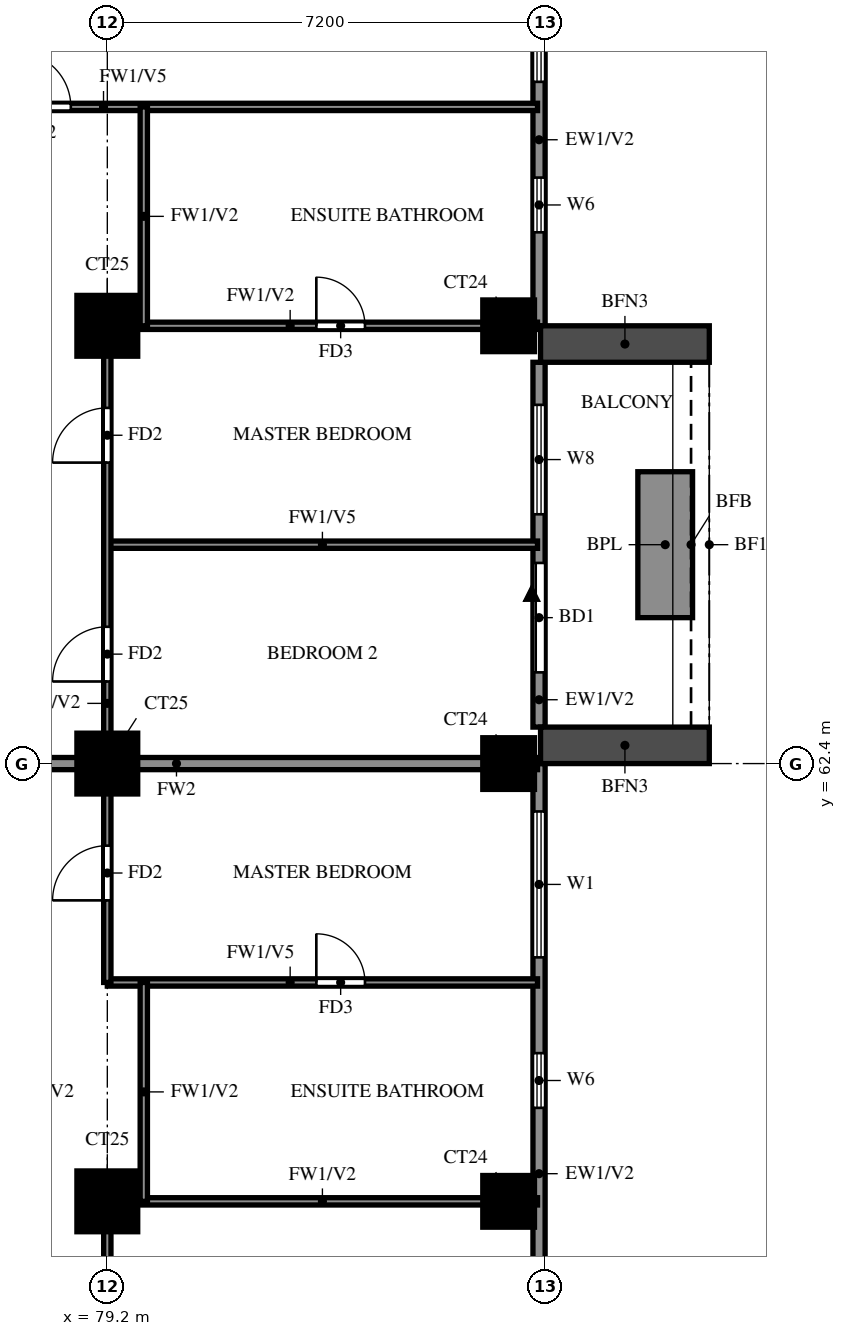
"""IFC4 building model, lengths in metres.
Left out: names, types, materials, properties, quantities, classifications, styles, units other than length and angle.
Written with IfcOpenShell. Run it as: python <this file> out.ifc"""

import sys

from ifc_helpers import new_model, si_unit, direction, frame, frame_2d, origin, origin_2d, place, context, subcontext, project, spatial, rectangle, extrude, source, transform, mapped, element, fill, save


model = new_model("IFC4")
c1 = context("Model", 3, precision=1e-05, world=origin(), true_north=direction((0.0, 1.0)))
c2 = subcontext(c1, "Body", "Model", "MODEL_VIEW")
j1 = project(units=[si_unit("LENGTHUNIT", "METRE"), si_unit("PLANEANGLEUNIT", "RADIAN")], contexts=[c1])
p1 = place(None, origin())
s1 = spatial("IfcSite", under=j1, at=p1, CompositionType="ELEMENT")
p2 = place(p1, origin())
s2 = spatial("IfcBuilding", under=s1, at=p2, CompositionType="ELEMENT")
p3 = place(p2, frame((0.0, 0.0, 171.0)))
s3 = spatial("IfcBuildingStorey", under=s2, at=p3, CompositionType="ELEMENT", Elevation=171.0)
m1 = source(origin(), c2, "Body", "SweptSolid", [
    extrude(rectangle(XDim=1.0, YDim=1.0, at=origin_2d()), origin(), (0.0, 0.0, 1.0), 3.2),
])
p4 = place(p3, frame((79.2, 55.2, 0.0), z_axis=(0.0, 0.0, 1.0), x_axis=(1.0, 0.0, 0.0)))
e1 = element("IfcColumn", 1, at=p4, inside=s3, PredefinedType="COLUMN", context=c2, shape_type="MappedRepresentation", body=[
    mapped(m1, transform((0.0, 0.0, 0.0))),
])
m2 = source(origin(), c2, "Body", "SweptSolid", [
    extrude(rectangle(XDim=0.85, YDim=0.85, at=origin_2d()), origin(), (0.0, 0.0, 1.0), 3.2),
])
p5 = place(p3, frame((85.8, 55.2, 0.0), z_axis=(0.0, 0.0, 1.0), x_axis=(1.0, 0.0, 0.0)))
e2 = element("IfcColumn", 2, at=p5, inside=s3, PredefinedType="COLUMN", context=c2, shape_type="MappedRepresentation", body=[
    mapped(m2, transform((0.0, 0.0, 0.0))),
])
p6 = place(p3, frame((79.2, 62.4, 0.0), z_axis=(0.0, 0.0, 1.0), x_axis=(1.0, 0.0, 0.0)))
e3 = element("IfcColumn", 3, at=p6, inside=s3, PredefinedType="COLUMN", context=c2, shape_type="MappedRepresentation", body=[
    mapped(m1, transform((0.0, 0.0, 0.0))),
])
p7 = place(p3, frame((85.8, 62.4, 0.0), z_axis=(0.0, 0.0, 1.0), x_axis=(1.0, 0.0, 0.0)))
e4 = element("IfcColumn", 4, at=p7, inside=s3, PredefinedType="COLUMN", context=c2, shape_type="MappedRepresentation", body=[
    mapped(m2, transform((0.0, 0.0, 0.0))),
])
p8 = place(p3, frame((79.2, 69.6, 0.0), z_axis=(0.0, 0.0, 1.0), x_axis=(1.0, 0.0, 0.0)))
e5 = element("IfcColumn", 5, at=p8, inside=s3, PredefinedType="COLUMN", context=c2, shape_type="MappedRepresentation", body=[
    mapped(m1, transform((0.0, 0.0, 0.0))),
])
p9 = place(p3, frame((85.8, 69.6, 0.0), z_axis=(0.0, 0.0, 1.0), x_axis=(1.0, 0.0, 0.0)))
e6 = element("IfcColumn", 6, at=p9, inside=s3, PredefinedType="COLUMN", context=c2, shape_type="MappedRepresentation", body=[
    mapped(m2, transform((0.0, 0.0, 0.0))),
])
p10 = place(p3, frame((86.3, 48.2, 0.0), z_axis=(0.0, 0.0, 1.0), x_axis=(0.0, 1.0, 0.0)))
e7 = element("IfcWall", 7, at=p10, inside=s3, PredefinedType="SOLIDWALL", context=c2, shape_type="SweptSolid", body=[
    extrude(rectangle(XDim=14.2, YDim=0.2, at=frame_2d((7.1, 0.0))), origin(), (0.0, 0.0, 1.0), 3.2),
])
p11 = place(p10, frame((0.775, 0.0, 0.6)))
e8 = element("IfcOpeningElement", 8, at=p11, cuts=e7, PredefinedType="OPENING", context=c2, shape_type="SweptSolid", body=[
    extrude(rectangle(XDim=2.4, YDim=2.4, at=frame_2d((1.2, 1.2))), frame((0.0, 0.11, 0.0), z_axis=(0.0, -1.0, 0.0), x_axis=(1.0, 0.0, 0.0)), (0.0, 0.0, 1.0), 0.22),
])
p12 = place(p10, frame((3.65, 0.0, 0.6)))
e9 = element("IfcOpeningElement", 9, at=p12, cuts=e7, PredefinedType="OPENING", context=c2, shape_type="SweptSolid", body=[
    extrude(rectangle(XDim=2.4, YDim=2.4, at=frame_2d((1.2, 1.2))), frame((0.0, 0.11, 0.0), z_axis=(0.0, -1.0, 0.0), x_axis=(1.0, 0.0, 0.0)), (0.0, 0.0, 1.0), 0.22),
])
p13 = place(p10, frame((11.012, 0.0, 0.6)))
e10 = element("IfcOpeningElement", 10, at=p13, cuts=e7, PredefinedType="OPENING", context=c2, shape_type="SweptSolid", body=[
    extrude(rectangle(XDim=2.4, YDim=2.4, at=frame_2d((1.2, 1.2))), frame((0.0, 0.11, 0.0), z_axis=(0.0, -1.0, 0.0), x_axis=(1.0, 0.0, 0.0)), (0.0, 0.0, 1.0), 0.22),
])
p14 = place(p10, frame((8.538, 0.0, 1.5)))
e11 = element("IfcOpeningElement", 11, at=p14, cuts=e7, PredefinedType="OPENING", context=c2, shape_type="SweptSolid", body=[
    extrude(rectangle(XDim=0.9, YDim=0.9, at=frame_2d((0.45, 0.45))), frame((0.0, 0.11, 0.0), z_axis=(0.0, -1.0, 0.0), x_axis=(1.0, 0.0, 0.0)), (0.0, 0.0, 1.0), 0.22),
])
p15 = place(p3, frame((86.3, 63.0, 0.0), z_axis=(0.0, 0.0, 1.0), x_axis=(0.0, 1.0, 0.0)))
e12 = element("IfcWall", 12, at=p15, inside=s3, PredefinedType="SOLIDWALL", context=c2, shape_type="SweptSolid", body=[
    extrude(rectangle(XDim=6.0, YDim=0.2, at=frame_2d((3.0, 0.0))), origin(), (0.0, 0.0, 1.0), 3.2),
])
p16 = place(p15, frame((0.9, 0.0, 0.0)))
e13 = element("IfcOpeningElement", 13, at=p16, cuts=e12, PredefinedType="OPENING", context=c2, shape_type="SweptSolid", body=[
    extrude(rectangle(XDim=1.8, YDim=2.4, at=frame_2d((0.9, 1.2))), frame((0.0, 0.11, 0.0), z_axis=(0.0, -1.0, 0.0), x_axis=(1.0, 0.0, 0.0)), (0.0, 0.0, 1.0), 0.22),
])
p17 = place(p15, frame((3.5, 0.0, 0.6)))
e14 = element("IfcOpeningElement", 14, at=p17, cuts=e12, PredefinedType="OPENING", context=c2, shape_type="SweptSolid", body=[
    extrude(rectangle(XDim=1.8, YDim=2.4, at=frame_2d((0.9, 1.2))), frame((0.0, 0.11, 0.0), z_axis=(0.0, -1.0, 0.0), x_axis=(1.0, 0.0, 0.0)), (0.0, 0.0, 1.0), 0.22),
])
p18 = place(p3, frame((86.3, 69.6, 0.0), z_axis=(0.0, 0.0, 1.0), x_axis=(0.0, 1.0, 0.0)))
e15 = element("IfcWall", 15, at=p18, inside=s3, PredefinedType="SOLIDWALL", context=c2, shape_type="SweptSolid", body=[
    extrude(rectangle(XDim=7.2, YDim=0.2, at=frame_2d((3.6, 0.0))), origin(), (0.0, 0.0, 1.0), 3.2),
])
p19 = place(p18, frame((1.538, 0.0, 1.5)))
e16 = element("IfcOpeningElement", 16, at=p19, cuts=e15, PredefinedType="OPENING", context=c2, shape_type="SweptSolid", body=[
    extrude(rectangle(XDim=0.9, YDim=0.9, at=frame_2d((0.45, 0.45))), frame((0.0, 0.11, 0.0), z_axis=(0.0, -1.0, 0.0), x_axis=(1.0, 0.0, 0.0)), (0.0, 0.0, 1.0), 0.22),
])
p20 = place(p18, frame((4.012, 0.0, 0.6)))
e17 = element("IfcOpeningElement", 17, at=p20, cuts=e15, PredefinedType="OPENING", context=c2, shape_type="SweptSolid", body=[
    extrude(rectangle(XDim=2.4, YDim=2.4, at=frame_2d((1.2, 1.2))), frame((0.0, 0.11, 0.0), z_axis=(0.0, -1.0, 0.0), x_axis=(1.0, 0.0, 0.0)), (0.0, 0.0, 1.0), 0.22),
])
for number, where, z_axis, x_axis in (
    (18, (86.325, 62.7, 0.0), (0.0, 0.0, 1.0), (1.0, 0.0, 0.0)),
    (19, (86.325, 69.3, 0.0), (0.0, 0.0, 1.0), (1.0, 0.0, 0.0)),
):
    element("IfcWall", number, at=place(p3, frame(where, z_axis=z_axis, x_axis=x_axis)), inside=s3, PredefinedType="SOLIDWALL", context=c2, shape_type="SweptSolid", body=[
        extrude(rectangle(XDim=2.775, YDim=0.6, at=frame_2d((1.388, 0.0))), origin(), (0.0, 0.0, 1.0), 2.85),
    ])
p21 = place(p3, frame((88.375, 64.8, 0.0), z_axis=(0.0, 0.0, 1.0), x_axis=(0.0, 1.0, 0.0)))
e20 = element("IfcWall", 20, at=p21, inside=s3, PredefinedType="SOLIDWALL", context=c2, shape_type="SweptSolid", body=[
    extrude(rectangle(XDim=2.4, YDim=0.9, at=frame_2d((1.2, 0.0))), origin(), (0.0, 0.0, 1.0), 0.9),
])
p22 = place(p3, frame((74.4, 62.4, 0.0), z_axis=(0.0, 0.0, 1.0), x_axis=(1.0, 0.0, 0.0)))
e21 = element("IfcWall", 21, at=p22, inside=s3, PredefinedType="SOLIDWALL", context=c2, shape_type="SweptSolid", body=[
    extrude(rectangle(XDim=11.875, YDim=0.2, at=frame_2d((5.938, 0.0))), origin(), (0.0, 0.0, 1.0), 3.2),
])
p23 = place(p3, frame((79.2, 55.2, 0.0), z_axis=(0.0, 0.0, 1.0), x_axis=(1.0, 0.0, 0.0)))
e22 = element("IfcWall", 22, at=p23, inside=s3, PredefinedType="PARTITIONING", context=c2, shape_type="SweptSolid", body=[
    extrude(rectangle(XDim=7.075, YDim=0.12, at=frame_2d((3.538, 0.0))), origin(), (0.0, 0.0, 1.0), 3.2),
])
p24 = place(p3, frame((79.2, 58.8, 0.0), z_axis=(0.0, 0.0, 1.0), x_axis=(1.0, 0.0, 0.0)))
e23 = element("IfcWall", 23, at=p24, inside=s3, PredefinedType="PARTITIONING", context=c2, shape_type="SweptSolid", body=[
    extrude(rectangle(XDim=7.075, YDim=0.12, at=frame_2d((3.538, 0.0))), origin(), (0.0, 0.0, 1.0), 2.3),
])
p25 = place(p24, frame((3.438, 0.0, 0.0)))
e24 = element("IfcOpeningElement", 24, at=p25, cuts=e23, PredefinedType="OPENING", context=c2, shape_type="SweptSolid", body=[
    extrude(rectangle(XDim=0.8, YDim=2.1, at=frame_2d((0.4, 1.05))), frame((0.0, 0.07, 0.0), z_axis=(0.0, -1.0, 0.0), x_axis=(1.0, 0.0, 0.0)), (0.0, 0.0, 1.0), 0.14),
])
p26 = place(p3, frame((79.2, 66.0, 0.0), z_axis=(0.0, 0.0, 1.0), x_axis=(1.0, 0.0, 0.0)))
e25 = element("IfcWall", 25, at=p26, inside=s3, PredefinedType="PARTITIONING", context=c2, shape_type="SweptSolid", body=[
    extrude(rectangle(XDim=7.075, YDim=0.12, at=frame_2d((3.538, 0.0))), origin(), (0.0, 0.0, 1.0), 2.3),
])
p27 = place(p3, frame((79.2, 69.6, 0.0), z_axis=(0.0, 0.0, 1.0), x_axis=(1.0, 0.0, 0.0)))
e26 = element("IfcWall", 26, at=p27, inside=s3, PredefinedType="PARTITIONING", context=c2, shape_type="SweptSolid", body=[
    extrude(rectangle(XDim=7.075, YDim=0.12, at=frame_2d((3.538, 0.0))), origin(), (0.0, 0.0, 1.0), 3.2),
])
p28 = place(p27, frame((3.438, 0.0, 0.0)))
e27 = element("IfcOpeningElement", 27, at=p28, cuts=e26, PredefinedType="OPENING", context=c2, shape_type="SweptSolid", body=[
    extrude(rectangle(XDim=0.8, YDim=2.1, at=frame_2d((0.4, 1.05))), frame((0.0, 0.07, 0.0), z_axis=(0.0, -1.0, 0.0), x_axis=(1.0, 0.0, 0.0)), (0.0, 0.0, 1.0), 0.14),
])
p29 = place(p3, frame((72.0, 73.2, 0.0), z_axis=(0.0, 0.0, 1.0), x_axis=(1.0, 0.0, 0.0)))
e28 = element("IfcWall", 28, at=p29, inside=s3, PredefinedType="PARTITIONING", context=c2, shape_type="SweptSolid", body=[
    extrude(rectangle(XDim=14.275, YDim=0.12, at=frame_2d((7.137, 0.0))), origin(), (0.0, 0.0, 1.0), 2.3),
])
p30 = place(p29, frame((5.7, 0.0, 0.0)))
e29 = element("IfcOpeningElement", 29, at=p30, cuts=e28, PredefinedType="OPENING", context=c2, shape_type="SweptSolid", body=[
    extrude(rectangle(XDim=0.9, YDim=2.1, at=frame_2d((0.45, 1.05))), frame((0.0, 0.07, 0.0), z_axis=(0.0, -1.0, 0.0), x_axis=(1.0, 0.0, 0.0)), (0.0, 0.0, 1.0), 0.14),
])
p31 = place(p3, frame((79.2, 48.125, 0.0), z_axis=(0.0, 0.0, 1.0), x_axis=(0.0, 1.0, 0.0)))
e30 = element("IfcWall", 30, at=p31, inside=s3, PredefinedType="PARTITIONING", context=c2, shape_type="SweptSolid", body=[
    extrude(rectangle(XDim=7.075, YDim=0.12, at=frame_2d((3.538, 0.0))), origin(), (0.0, 0.0, 1.0), 3.2),
])
p32 = place(p31, frame((2.788, 0.0, 0.0)))
e31 = element("IfcOpeningElement", 31, at=p32, cuts=e30, PredefinedType="OPENING", context=c2, shape_type="SweptSolid", body=[
    extrude(rectangle(XDim=1.5, YDim=2.1, at=frame_2d((0.75, 1.05))), frame((0.0, 0.07, 0.0), z_axis=(0.0, -1.0, 0.0), x_axis=(1.0, 0.0, 0.0)), (0.0, 0.0, 1.0), 0.14),
])
p33 = place(p3, frame((79.2, 58.8, 0.0), z_axis=(0.0, 0.0, 1.0), x_axis=(0.0, 1.0, 0.0)))
e32 = element("IfcWall", 32, at=p33, inside=s3, PredefinedType="PARTITIONING", context=c2, shape_type="SweptSolid", body=[
    extrude(rectangle(XDim=10.8, YDim=0.12, at=frame_2d((5.4, 0.0))), origin(), (0.0, 0.0, 1.0), 3.2),
])
p34 = place(p33, frame((1.35, 0.0, 0.0)))
e33 = element("IfcOpeningElement", 33, at=p34, cuts=e32, PredefinedType="OPENING", context=c2, shape_type="SweptSolid", body=[
    extrude(rectangle(XDim=0.9, YDim=2.1, at=frame_2d((0.45, 1.05))), frame((0.0, 0.07, 0.0), z_axis=(0.0, -1.0, 0.0), x_axis=(1.0, 0.0, 0.0)), (0.0, 0.0, 1.0), 0.14),
])
p35 = place(p33, frame((4.95, 0.0, 0.0)))
e34 = element("IfcOpeningElement", 34, at=p35, cuts=e32, PredefinedType="OPENING", context=c2, shape_type="SweptSolid", body=[
    extrude(rectangle(XDim=0.9, YDim=2.1, at=frame_2d((0.45, 1.05))), frame((0.0, 0.07, 0.0), z_axis=(0.0, -1.0, 0.0), x_axis=(1.0, 0.0, 0.0)), (0.0, 0.0, 1.0), 0.14),
])
p36 = place(p33, frame((8.55, 0.0, 0.0)))
e35 = element("IfcOpeningElement", 35, at=p36, cuts=e32, PredefinedType="OPENING", context=c2, shape_type="SweptSolid", body=[
    extrude(rectangle(XDim=0.9, YDim=2.1, at=frame_2d((0.45, 1.05))), frame((0.0, 0.07, 0.0), z_axis=(0.0, -1.0, 0.0), x_axis=(1.0, 0.0, 0.0)), (0.0, 0.0, 1.0), 0.14),
])
p37 = place(p3, frame((79.8, 55.2, 0.0), z_axis=(0.0, 0.0, 1.0), x_axis=(0.0, 1.0, 0.0)))
e36 = element("IfcWall", 36, at=p37, inside=s3, PredefinedType="PARTITIONING", context=c2, shape_type="SweptSolid", body=[
    extrude(rectangle(XDim=3.6, YDim=0.12, at=frame_2d((1.8, 0.0))), origin(), (0.0, 0.0, 1.0), 3.2),
])
p38 = place(p3, frame((79.8, 69.6, 0.0), z_axis=(0.0, 0.0, 1.0), x_axis=(0.0, 1.0, 0.0)))
e37 = element("IfcWall", 37, at=p38, inside=s3, PredefinedType="PARTITIONING", context=c2, shape_type="SweptSolid", body=[
    extrude(rectangle(XDim=3.6, YDim=0.12, at=frame_2d((1.8, 0.0))), origin(), (0.0, 0.0, 1.0), 3.2),
])
p39 = place(p13, origin())
e38 = element("IfcWindow", 38, at=p39, inside=s3, PartitioningType="DOUBLE_PANEL_VERTICAL", PredefinedType="WINDOW", context=c2, shape_type="SweptSolid", body=[
    extrude(rectangle(XDim=2.4, YDim=2.4, at=frame_2d((1.2, 1.2))), frame((0.0, 0.03, 0.0), z_axis=(0.0, -1.0, 0.0), x_axis=(1.0, 0.0, 0.0)), (0.0, 0.0, 1.0), 0.06),
])
fill(e10, e38)
p40 = place(p14, origin())
e39 = element("IfcWindow", 39, at=p40, inside=s3, PartitioningType="SINGLE_PANEL", PredefinedType="WINDOW", context=c2, shape_type="SweptSolid", body=[
    extrude(rectangle(XDim=0.9, YDim=0.9, at=frame_2d((0.45, 0.45))), frame((0.0, 0.03, 0.0), z_axis=(0.0, -1.0, 0.0), x_axis=(1.0, 0.0, 0.0)), (0.0, 0.0, 1.0), 0.06),
])
fill(e11, e39)
p41 = place(p16, origin())
e40 = element("IfcDoor", 40, at=p41, inside=s3, OperationType="DOUBLE_DOOR_SLIDING", PredefinedType="DOOR", context=c2, shape_type="SweptSolid", body=[
    extrude(rectangle(XDim=1.8, YDim=2.4, at=frame_2d((0.9, 1.2))), frame((0.0, 0.025, 0.0), z_axis=(0.0, -1.0, 0.0), x_axis=(1.0, 0.0, 0.0)), (0.0, 0.0, 1.0), 0.05),
])
fill(e13, e40)
p42 = place(p17, origin())
e41 = element("IfcWindow", 41, at=p42, inside=s3, PartitioningType="DOUBLE_PANEL_VERTICAL", PredefinedType="WINDOW", context=c2, shape_type="SweptSolid", body=[
    extrude(rectangle(XDim=1.8, YDim=2.4, at=frame_2d((0.9, 1.2))), frame((0.0, 0.03, 0.0), z_axis=(0.0, -1.0, 0.0), x_axis=(1.0, 0.0, 0.0)), (0.0, 0.0, 1.0), 0.06),
])
fill(e14, e41)
p43 = place(p19, origin())
e42 = element("IfcWindow", 42, at=p43, inside=s3, PartitioningType="SINGLE_PANEL", PredefinedType="WINDOW", context=c2, shape_type="SweptSolid", body=[
    extrude(rectangle(XDim=0.9, YDim=0.9, at=frame_2d((0.45, 0.45))), frame((0.0, 0.03, 0.0), z_axis=(0.0, -1.0, 0.0), x_axis=(1.0, 0.0, 0.0)), (0.0, 0.0, 1.0), 0.06),
])
fill(e16, e42)
p44 = place(p20, origin())
e43 = element("IfcWindow", 43, at=p44, inside=s3, PartitioningType="DOUBLE_PANEL_VERTICAL", PredefinedType="WINDOW", context=c2, shape_type="SweptSolid", body=[
    extrude(rectangle(XDim=2.4, YDim=2.4, at=frame_2d((1.2, 1.2))), frame((0.0, 0.03, 0.0), z_axis=(0.0, -1.0, 0.0), x_axis=(1.0, 0.0, 0.0)), (0.0, 0.0, 1.0), 0.06),
])
fill(e17, e43)
p45 = place(p34, origin())
e44 = element("IfcDoor", 44, at=p45, inside=s3, OperationType="SINGLE_SWING_LEFT", PredefinedType="DOOR", context=c2, shape_type="SweptSolid", body=[
    extrude(rectangle(XDim=0.9, YDim=2.1, at=frame_2d((0.45, 1.05))), frame((0.0, 0.025, 0.0), z_axis=(0.0, -1.0, 0.0), x_axis=(1.0, 0.0, 0.0)), (0.0, 0.0, 1.0), 0.05),
])
fill(e33, e44)
p46 = place(p25, origin())
e45 = element("IfcDoor", 45, at=p46, inside=s3, OperationType="SINGLE_SWING_RIGHT", PredefinedType="DOOR", context=c2, shape_type="SweptSolid", body=[
    extrude(rectangle(XDim=0.8, YDim=2.1, at=frame_2d((0.4, 1.05))), frame((0.0, 0.025, 0.0), z_axis=(0.0, -1.0, 0.0), x_axis=(1.0, 0.0, 0.0)), (0.0, 0.0, 1.0), 0.05),
])
fill(e24, e45)
p47 = place(p35, origin())
e46 = element("IfcDoor", 46, at=p47, inside=s3, OperationType="SINGLE_SWING_LEFT", PredefinedType="DOOR", context=c2, shape_type="SweptSolid", body=[
    extrude(rectangle(XDim=0.9, YDim=2.1, at=frame_2d((0.45, 1.05))), frame((0.0, 0.025, 0.0), z_axis=(0.0, -1.0, 0.0), x_axis=(1.0, 0.0, 0.0)), (0.0, 0.0, 1.0), 0.05),
])
fill(e34, e46)
p48 = place(p36, origin())
e47 = element("IfcDoor", 47, at=p48, inside=s3, OperationType="SINGLE_SWING_LEFT", PredefinedType="DOOR", context=c2, shape_type="SweptSolid", body=[
    extrude(rectangle(XDim=0.9, YDim=2.1, at=frame_2d((0.45, 1.05))), frame((0.0, 0.025, 0.0), z_axis=(0.0, -1.0, 0.0), x_axis=(1.0, 0.0, 0.0)), (0.0, 0.0, 1.0), 0.05),
])
fill(e35, e47)
p49 = place(p28, origin())
e48 = element("IfcDoor", 48, at=p49, inside=s3, OperationType="SINGLE_SWING_RIGHT", PredefinedType="DOOR", context=c2, shape_type="SweptSolid", body=[
    extrude(rectangle(XDim=0.8, YDim=2.1, at=frame_2d((0.4, 1.05))), frame((0.0, 0.025, 0.0), z_axis=(0.0, -1.0, 0.0), x_axis=(1.0, 0.0, 0.0)), (0.0, 0.0, 1.0), 0.05),
])
fill(e27, e48)
p50 = place(p30, origin())
e49 = element("IfcDoor", 49, at=p50, inside=s3, OperationType="SINGLE_SWING_LEFT", PredefinedType="DOOR", context=c2, shape_type="SweptSolid", body=[
    extrude(rectangle(XDim=0.9, YDim=2.1, at=frame_2d((0.45, 1.05))), frame((0.0, 0.025, 0.0), z_axis=(0.0, -1.0, 0.0), x_axis=(1.0, 0.0, 0.0)), (0.0, 0.0, 1.0), 0.05),
])
fill(e29, e49)
save(model, sys.argv[1])
